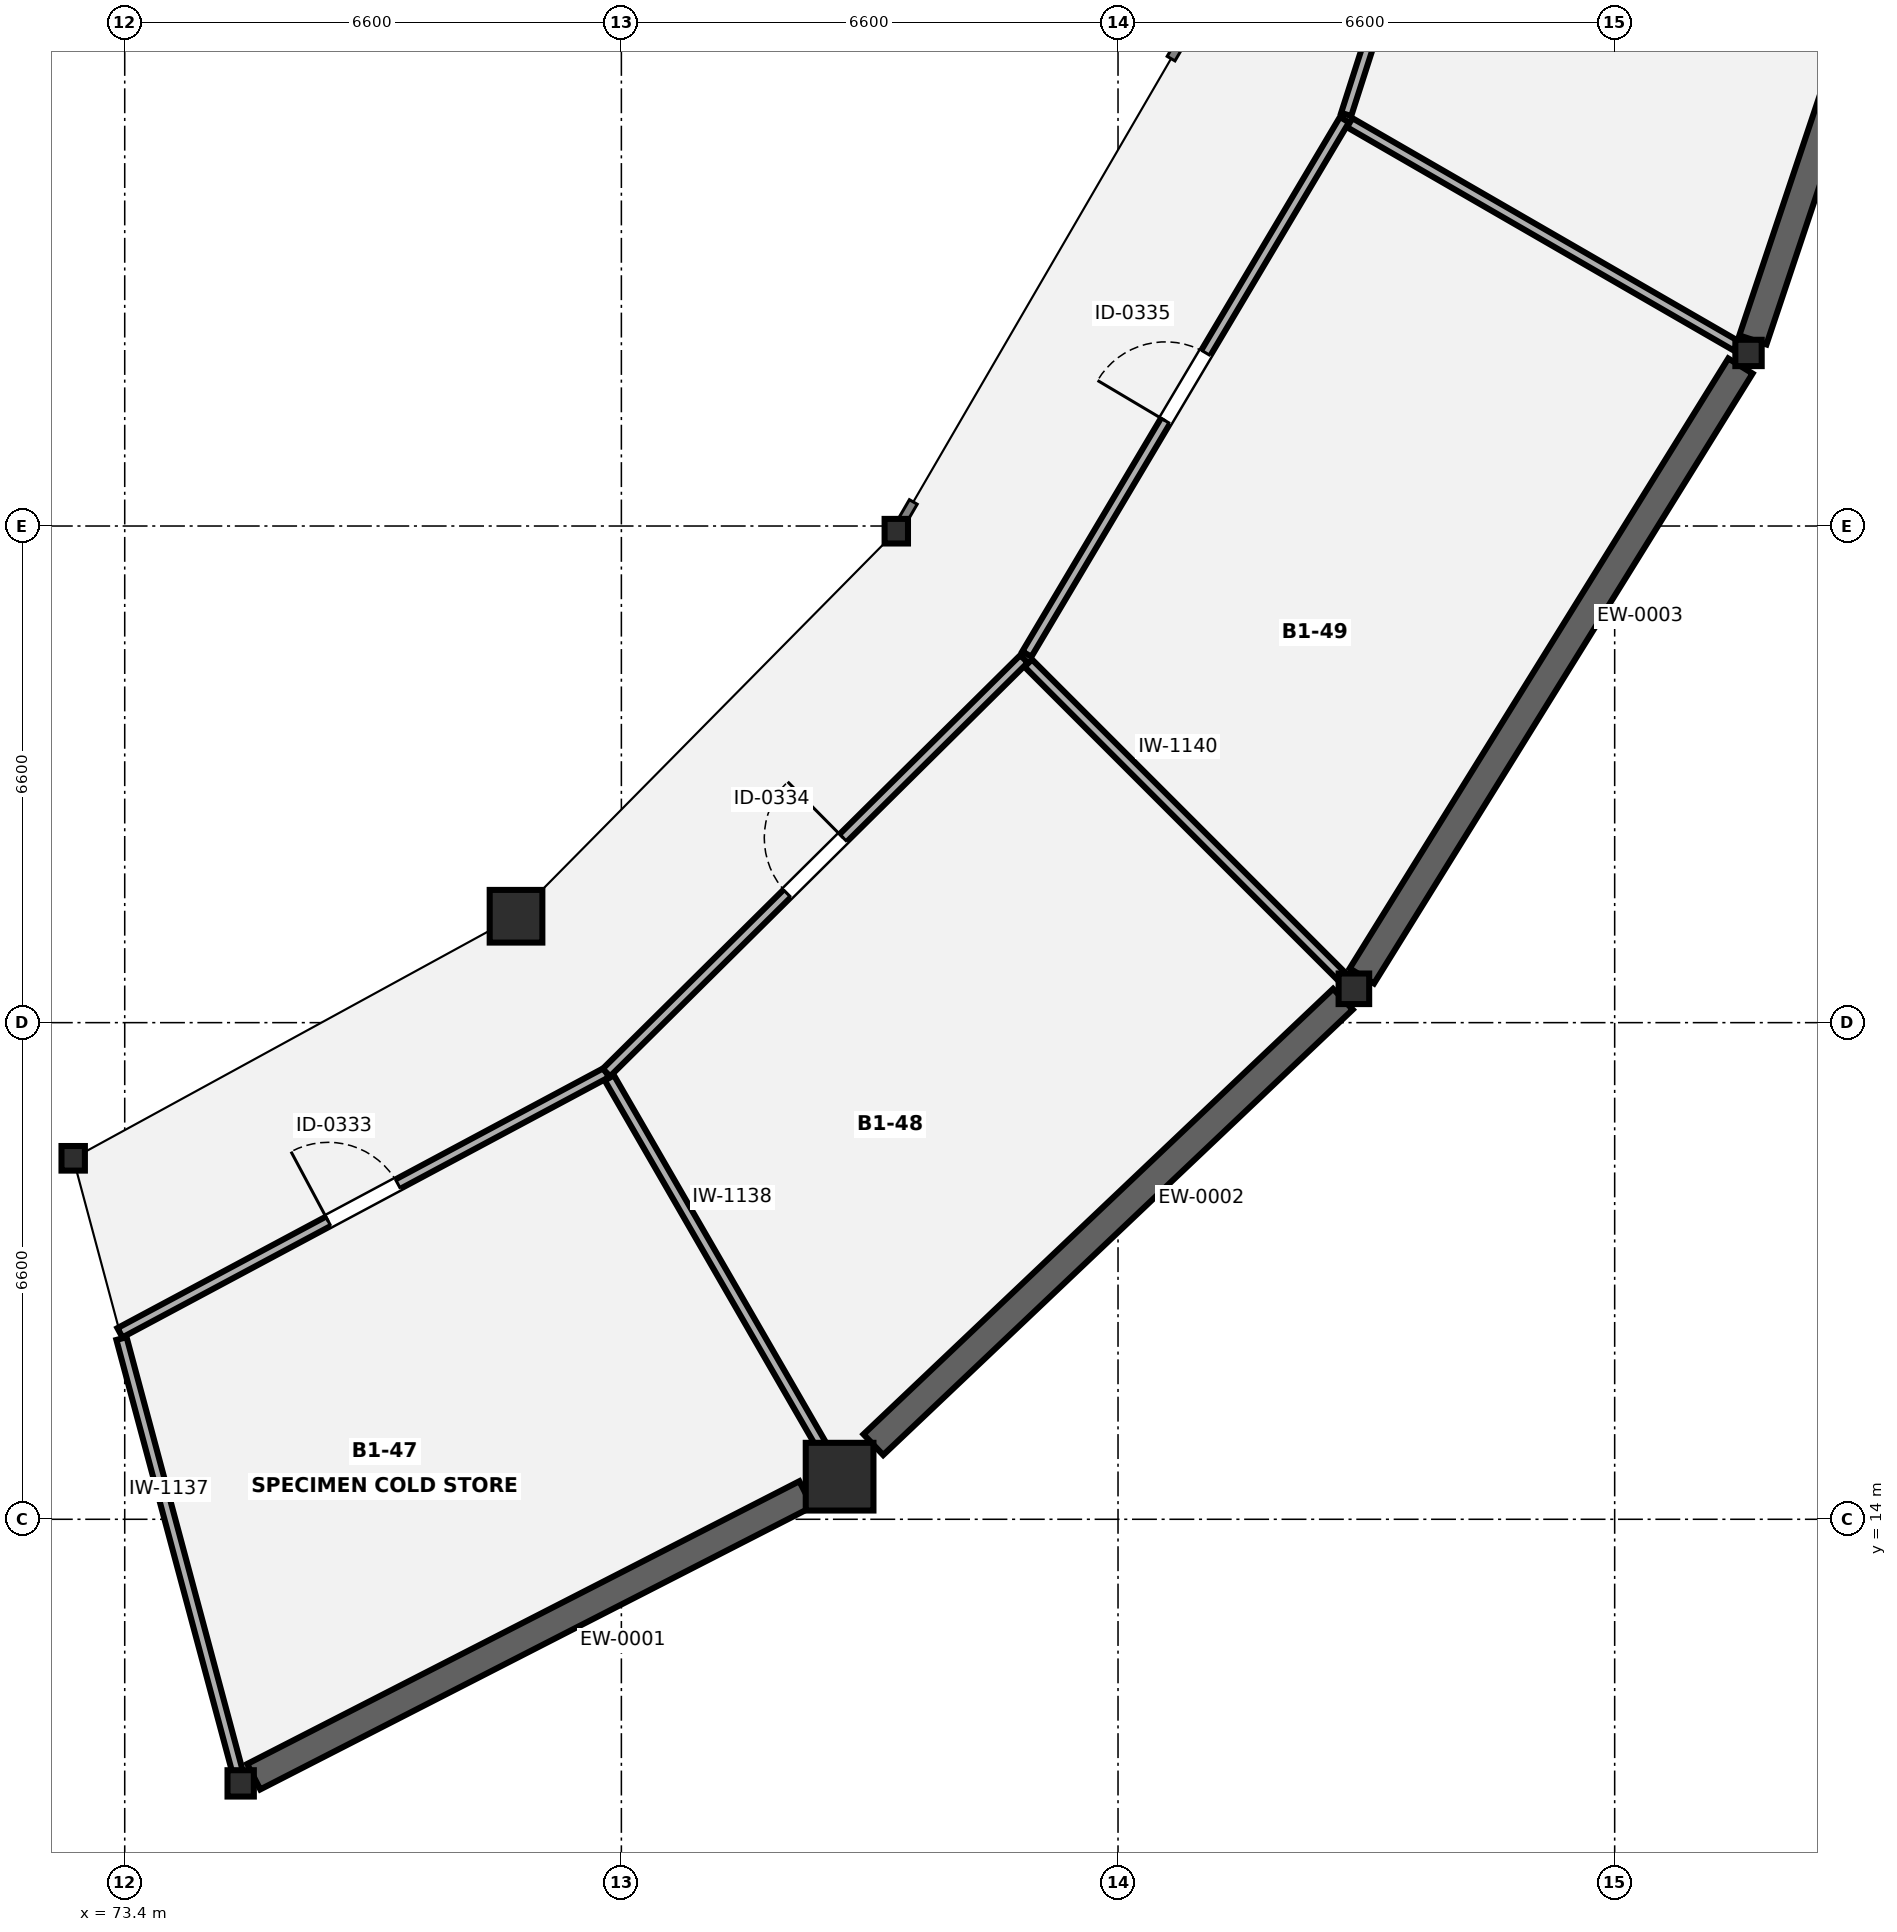
"""IFC4 building model, lengths in metres.
Left out: names, types, materials, properties, quantities, classifications, styles, units other than length and angle.
Written with IfcOpenShell. Run it as: python <this file> out.ifc"""

import sys

from ifc_helpers import new_model, si_unit, direction, frame, frame_2d, origin, origin_2d, place, context, subcontext, project, spatial, rectangle, hollow_circle, i_section, extrude, element, fill, save


model = new_model("IFC4")
c1 = context("Model", 3, precision=1e-05, world=origin(), true_north=direction((0.0, 1.0)))
c2 = subcontext(c1, "Body", "Model", "MODEL_VIEW")
j1 = project(units=[si_unit("LENGTHUNIT", "METRE"), si_unit("PLANEANGLEUNIT", "RADIAN")], contexts=[c1])
p1 = place(None, origin())
s1 = spatial("IfcSite", under=j1, at=p1, CompositionType="ELEMENT")
p2 = place(p1, origin())
s2 = spatial("IfcBuilding", under=s1, at=p2, CompositionType="ELEMENT")
p3 = place(p2, frame((0.0, 0.0, -4.2)))
s3 = spatial("IfcBuildingStorey", under=s2, at=p3, CompositionType="ELEMENT", Elevation=-4.2)
p4 = place(p3, frame((74.941, 10.49, 0.0), z_axis=(0.0, 0.0, 1.0), x_axis=(1.0, 0.0, 0.0)))
e1 = element("IfcColumn", 1, at=p4, inside=s3, PredefinedType="COLUMN", context=c2, shape_type="SweptSolid", body=[
    extrude(i_section(OverallWidth=0.35, OverallDepth=0.35, WebThickness=0.02, FlangeThickness=0.032, FilletRadius=0.016, at=origin_2d()), origin(), (0.0, 0.0, 1.0), 4.2),
])
p5 = place(p3, frame((72.715, 18.797, 0.0), z_axis=(0.0, 0.0, 1.0), x_axis=(1.0, 0.0, 0.0)))
e2 = element("IfcColumn", 2, at=p5, inside=s3, PredefinedType="COLUMN", context=c2, shape_type="SweptSolid", body=[
    extrude(i_section(OverallWidth=0.311, OverallDepth=0.327, WebThickness=0.016, FlangeThickness=0.025, FilletRadius=0.017, at=origin_2d()), origin(), (0.0, 0.0, 1.0), 4.2),
])
p6 = place(p3, frame((82.9, 14.566, 0.0), z_axis=(0.0, 0.0, 1.0), x_axis=(1.0, 0.0, 0.0)))
e3 = element("IfcColumn", 3, at=p6, inside=s3, PredefinedType="COLUMN", context=c2, shape_type="SweptSolid", body=[
    extrude(rectangle(XDim=0.9, YDim=0.9, at=origin_2d()), origin(), (0.0, 0.0, 1.0), 4.2),
])
p7 = place(p3, frame((78.6, 22.014, 0.0), z_axis=(0.0, 0.0, 1.0), x_axis=(1.0, 0.0, 0.0)))
e4 = element("IfcColumn", 4, at=p7, inside=s3, PredefinedType="COLUMN", context=c2, shape_type="SweptSolid", body=[
    extrude(rectangle(XDim=0.7, YDim=0.7, at=origin_2d()), origin(), (0.0, 0.0, 1.0), 4.2),
])
p8 = place(p3, frame((89.735, 21.05, 0.0), z_axis=(0.0, 0.0, 1.0), x_axis=(1.0, 0.0, 0.0)))
e5 = element("IfcColumn", 5, at=p8, inside=s3, PredefinedType="COLUMN", context=c2, shape_type="SweptSolid", body=[
    extrude(hollow_circle(Radius=0.203, WallThickness=0.013, at=origin_2d()), origin(), (0.0, 0.0, 1.0), 4.2),
])
p9 = place(p3, frame((83.653, 27.131, 0.0), z_axis=(0.0, 0.0, 1.0), x_axis=(1.0, 0.0, 0.0)))
e6 = element("IfcColumn", 6, at=p9, inside=s3, PredefinedType="COLUMN", context=c2, shape_type="SweptSolid", body=[
    extrude(i_section(OverallWidth=0.311, OverallDepth=0.327, WebThickness=0.016, FlangeThickness=0.025, FilletRadius=0.017, at=origin_2d()), origin(), (0.0, 0.0, 1.0), 4.2),
])
p10 = place(p3, frame((94.979, 29.5, 0.0), z_axis=(0.0, 0.0, 1.0), x_axis=(1.0, 0.0, 0.0)))
e7 = element("IfcColumn", 7, at=p10, inside=s3, PredefinedType="COLUMN", context=c2, shape_type="SweptSolid", body=[
    extrude(i_section(OverallWidth=0.35, OverallDepth=0.35, WebThickness=0.02, FlangeThickness=0.032, FilletRadius=0.016, at=origin_2d()), origin(), (0.0, 0.0, 1.0), 4.2),
])
p11 = place(p3, frame((82.452, 14.337, 0.0), z_axis=(0.0, 0.0, 1.0), x_axis=(-0.890067688898, -0.455828376893, 0.0)))
e8 = element("IfcWall", 8, at=p11, inside=s3, PredefinedType="USERDEFINED", context=c2, shape_type="SweptSolid", body=[
    extrude(rectangle(XDim=8.244, YDim=0.38, at=frame_2d((4.122, 0.0))), origin(), (0.0, 0.0, 1.0), 3.9),
])
p12 = place(p3, frame((89.588, 20.912, 0.0), z_axis=(0.0, 0.0, 1.0), x_axis=(-0.725454249995, -0.688270391027, 0.0)))
e9 = element("IfcWall", 9, at=p12, inside=s3, PredefinedType="USERDEFINED", context=c2, shape_type="SweptSolid", body=[
    extrude(rectangle(XDim=8.601, YDim=0.38, at=frame_2d((4.301, 0.0))), origin(), (0.0, 0.0, 1.0), 3.9),
])
p13 = place(p3, frame((94.871, 29.327, 0.0), z_axis=(0.0, 0.0, 1.0), x_axis=(-0.527316356641, -0.849669029693, 0.0)))
e10 = element("IfcWall", 10, at=p13, inside=s3, PredefinedType="USERDEFINED", context=c2, shape_type="SweptSolid", body=[
    extrude(rectangle(XDim=9.54, YDim=0.38, at=frame_2d((4.77, 0.0))), origin(), (0.0, 0.0, 1.0), 3.9),
])
p14 = place(p3, frame((98.218, 39.167, 0.0), z_axis=(0.0, 0.0, 1.0), x_axis=(-0.317668467072, -0.948201848252, 0.0)))
e11 = element("IfcWall", 11, at=p14, inside=s3, PredefinedType="USERDEFINED", context=c2, shape_type="SweptSolid", body=[
    extrude(rectangle(XDim=10.012, YDim=0.38, at=frame_2d((5.006, 0.0))), origin(), (0.0, 0.0, 1.0), 3.9),
])
p15 = place(p3, frame((73.336, 16.479, 0.0), z_axis=(0.0, 0.0, 1.0), x_axis=(0.88182684056, 0.471573348768, 0.0)))
e12 = element("IfcWall", 12, at=p15, inside=s3, PredefinedType="PARTITIONING", context=c2, shape_type="SweptSolid", body=[
    extrude(rectangle(XDim=7.33, YDim=0.14, at=frame_2d((3.665, 0.0))), origin(), (0.0, 0.0, 1.0), 3.94),
])
p16 = place(p15, frame((3.14, 0.0, 0.0)))
e13 = element("IfcOpeningElement", 13, at=p16, cuts=e12, PredefinedType="OPENING", context=c2, shape_type="SweptSolid", body=[
    extrude(rectangle(XDim=1.05, YDim=2.15, at=frame_2d((0.525, 1.075))), frame((0.0, 0.08, 0.0), z_axis=(0.0, -1.0, 0.0), x_axis=(1.0, 0.0, 0.0)), (0.0, 0.0, 1.0), 0.16),
])
p17 = place(p3, frame((73.357, 16.402, 0.0), z_axis=(0.0, 0.0, 1.0), x_axis=(0.258805895167, -0.965929349708, 0.0)))
e14 = element("IfcWall", 14, at=p17, inside=s3, PredefinedType="PARTITIONING", context=c2, shape_type="SweptSolid", body=[
    extrude(rectangle(XDim=6.06, YDim=0.14, at=frame_2d((3.03, 0.0))), origin(), (0.0, 0.0, 1.0), 3.392),
])
p18 = place(p3, frame((79.84, 19.866, 0.0), z_axis=(0.0, 0.0, 1.0), x_axis=(0.500001726418, -0.866024407034, 0.0)))
e15 = element("IfcWall", 15, at=p18, inside=s3, PredefinedType="PARTITIONING", context=c2, shape_type="SweptSolid", body=[
    extrude(rectangle(XDim=5.928, YDim=0.14, at=frame_2d((2.964, 0.0))), origin(), (0.0, 0.0, 1.0), 3.313),
])
p19 = place(p3, frame((79.802, 19.937, 0.0), z_axis=(0.0, 0.0, 1.0), x_axis=(0.710427757183, 0.703770134222, 0.0)))
e16 = element("IfcWall", 16, at=p19, inside=s3, PredefinedType="PARTITIONING", context=c2, shape_type="SweptSolid", body=[
    extrude(rectangle(XDim=7.811, YDim=0.14, at=frame_2d((3.905, 0.0))), origin(), (0.0, 0.0, 1.0), 3.94),
])
p20 = place(p19, frame((3.381, 0.0, 0.0)))
e17 = element("IfcOpeningElement", 17, at=p20, cuts=e16, PredefinedType="OPENING", context=c2, shape_type="SweptSolid", body=[
    extrude(rectangle(XDim=1.05, YDim=2.15, at=frame_2d((0.525, 1.075))), frame((0.0, 0.08, 0.0), z_axis=(0.0, -1.0, 0.0), x_axis=(1.0, 0.0, 0.0)), (0.0, 0.0, 1.0), 0.16),
])
p21 = place(p3, frame((85.407, 25.377, 0.0), z_axis=(0.0, 0.0, 1.0), x_axis=(0.707106781187, -0.707106781187, 0.0)))
e18 = element("IfcWall", 18, at=p21, inside=s3, PredefinedType="PARTITIONING", context=c2, shape_type="SweptSolid", body=[
    extrude(rectangle(XDim=5.928, YDim=0.14, at=frame_2d((2.964, 0.0))), origin(), (0.0, 0.0, 1.0), 3.323),
])
p22 = place(p3, frame((85.388, 25.498, 0.0), z_axis=(0.0, 0.0, 1.0), x_axis=(0.510914893672, 0.8596312997, 0.0)))
e19 = element("IfcWall", 19, at=p22, inside=s3, PredefinedType="PARTITIONING", context=c2, shape_type="SweptSolid", body=[
    extrude(rectangle(XDim=8.262, YDim=0.14, at=frame_2d((4.131, 0.0))), origin(), (0.0, 0.0, 1.0), 3.94),
])
p23 = place(p22, frame((3.606, 0.0, 0.0)))
e20 = element("IfcOpeningElement", 20, at=p23, cuts=e19, PredefinedType="OPENING", context=c2, shape_type="SweptSolid", body=[
    extrude(rectangle(XDim=1.05, YDim=2.15, at=frame_2d((0.525, 1.075))), frame((0.0, 0.08, 0.0), z_axis=(0.0, -1.0, 0.0), x_axis=(1.0, 0.0, 0.0)), (0.0, 0.0, 1.0), 0.16),
])
p24 = place(p3, frame((89.679, 32.56, 0.0), z_axis=(0.0, 0.0, 1.0), x_axis=(0.86603470313, -0.499983892715, 0.0)))
e21 = element("IfcWall", 21, at=p24, inside=s3, PredefinedType="PARTITIONING", context=c2, shape_type="SweptSolid", body=[
    extrude(rectangle(XDim=5.928, YDim=0.14, at=frame_2d((2.964, 0.0))), origin(), (0.0, 0.0, 1.0), 3.392),
])
p25 = place(p3, frame((89.632, 32.67, 0.0), z_axis=(0.0, 0.0, 1.0), x_axis=(0.305495322231, 0.952193577008, 0.0)))
e22 = element("IfcWall", 22, at=p25, inside=s3, PredefinedType="PARTITIONING", context=c2, shape_type="SweptSolid", body=[
    extrude(rectangle(XDim=8.69, YDim=0.14, at=frame_2d((4.345, 0.0))), origin(), (0.0, 0.0, 1.0), 3.94),
])
p26 = place(p25, frame((3.82, 0.0, 0.0)))
e23 = element("IfcOpeningElement", 23, at=p26, cuts=e22, PredefinedType="OPENING", context=c2, shape_type="SweptSolid", body=[
    extrude(rectangle(XDim=1.05, YDim=2.15, at=frame_2d((0.525, 1.075))), frame((0.0, 0.08, 0.0), z_axis=(0.0, -1.0, 0.0), x_axis=(1.0, 0.0, 0.0)), (0.0, 0.0, 1.0), 0.16),
])
p27 = place(p16, origin())
e24 = element("IfcDoor", 24, at=p27, inside=s3, OperationType="SINGLE_SWING_LEFT", PredefinedType="DOOR", context=c2, shape_type="SweptSolid", body=[
    extrude(rectangle(XDim=1.05, YDim=2.15, at=frame_2d((0.525, 1.075))), frame((0.0, 0.025, 0.0), z_axis=(0.0, -1.0, 0.0), x_axis=(1.0, 0.0, 0.0)), (0.0, 0.0, 1.0), 0.05),
])
fill(e13, e24)
p28 = place(p20, origin())
e25 = element("IfcDoor", 25, at=p28, inside=s3, OperationType="SINGLE_SWING_RIGHT", PredefinedType="DOOR", context=c2, shape_type="SweptSolid", body=[
    extrude(rectangle(XDim=1.05, YDim=2.15, at=frame_2d((0.525, 1.075))), frame((0.0, 0.025, 0.0), z_axis=(0.0, -1.0, 0.0), x_axis=(1.0, 0.0, 0.0)), (0.0, 0.0, 1.0), 0.05),
])
fill(e17, e25)
p29 = place(p23, origin())
e26 = element("IfcDoor", 26, at=p29, inside=s3, OperationType="SINGLE_SWING_LEFT", PredefinedType="DOOR", context=c2, shape_type="SweptSolid", body=[
    extrude(rectangle(XDim=1.05, YDim=2.15, at=frame_2d((0.525, 1.075))), frame((0.0, 0.025, 0.0), z_axis=(0.0, -1.0, 0.0), x_axis=(1.0, 0.0, 0.0)), (0.0, 0.0, 1.0), 0.05),
])
fill(e20, e26)
save(model, sys.argv[1])
